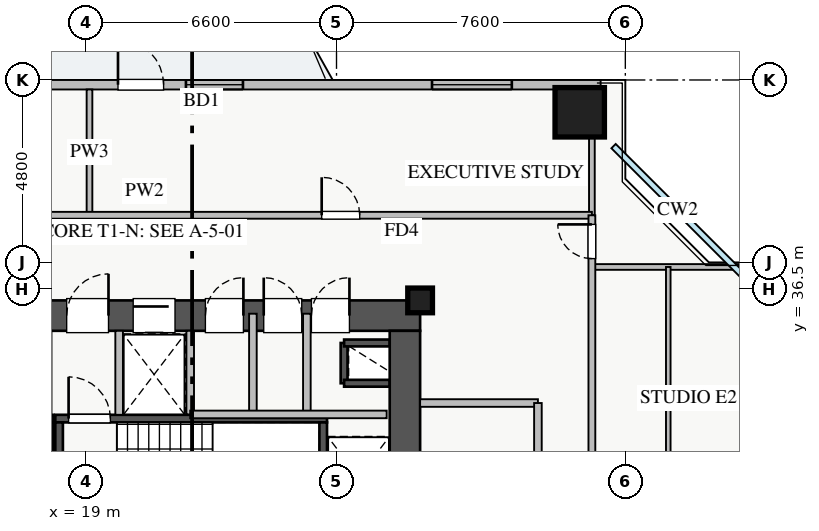
"""IFC4 building model, lengths in metres.
Left out: names, types, materials, properties, quantities, classifications, styles, units other than length and angle.
Written with IfcOpenShell. Run it as: python <this file> out.ifc"""

import sys

from ifc_helpers import new_model, si_unit, direction, frame, frame_2d, origin, origin_2d, place, context, subcontext, project, spatial, rectangle, extrude, source, transform, mapped, element, fill, save


model = new_model("IFC4")
c1 = context("Model", 3, precision=1e-05, world=origin(), true_north=direction((0.0, 1.0)))
c2 = subcontext(c1, "Body", "Model", "MODEL_VIEW")
j1 = project(units=[si_unit("LENGTHUNIT", "METRE"), si_unit("PLANEANGLEUNIT", "RADIAN")], contexts=[c1])
p1 = place(None, origin())
s1 = spatial("IfcSite", under=j1, at=p1, CompositionType="ELEMENT")
p2 = place(p1, origin())
s2 = spatial("IfcBuilding", under=s1, at=p2, CompositionType="ELEMENT")
p3 = place(p2, frame((0.0, 0.0, 23.0)))
s3 = spatial("IfcBuildingStorey", under=s2, at=p3, CompositionType="ELEMENT", Elevation=23.0)
p4 = place(p3, frame((25.8, 34.02, 0.0), z_axis=(0.0, 0.0, 1.0), x_axis=(0.0, 1.0, 0.0)))
e1 = element("IfcWall", 1, at=p4, inside=s3, PredefinedType="SHEAR", context=c2, shape_type="SweptSolid", body=[
    extrude(rectangle(XDim=1.06, YDim=0.18, at=frame_2d((0.53, 0.0))), origin(), (0.0, 0.0, 1.0), 3.07),
])
for number, where, z_axis, x_axis in (
    (2, (25.8, 35.08, 0.0), (0.0, 0.0, 1.0), (1.0, 0.0, 0.0)),
    (3, (25.8, 34.02, 0.0), (0.0, 0.0, 1.0), (1.0, 0.0, 0.0)),
):
    element("IfcWall", number, at=place(p3, frame(where, z_axis=z_axis, x_axis=x_axis)), inside=s3, PredefinedType="SHEAR", context=c2, shape_type="SweptSolid", body=[
        extrude(rectangle(XDim=1.2, YDim=0.18, at=frame_2d((0.6, 0.0))), origin(), (0.0, 0.0, 1.0), 3.07),
    ])
p5 = place(p3, frame((19.88, 33.2, 0.0), z_axis=(0.0, 0.0, 1.0), x_axis=(1.0, 0.0, 0.0)))
e4 = element("IfcWall", 4, at=p5, inside=s3, PredefinedType="SHEAR", context=c2, shape_type="SweptSolid", body=[
    extrude(rectangle(XDim=1.87, YDim=0.18, at=frame_2d((0.935, 0.0))), origin(), (0.0, 0.0, 1.0), 3.07),
])
p6 = place(p3, frame((11.0, 33.09, 0.0), z_axis=(0.0, 0.0, 1.0), x_axis=(1.0, 0.0, 0.0)))
e5 = element("IfcWall", 5, at=p6, inside=s3, PredefinedType="SHEAR", context=c2, shape_type="SweptSolid", body=[
    extrude(rectangle(XDim=7.15, YDim=0.2, at=frame_2d((3.575, 0.0))), origin(), (0.0, 0.0, 1.0), 3.25),
])
p7 = place(p6, frame((0.35, 0.0, 0.0)))
e6 = element("IfcOpeningElement", 6, at=p7, cuts=e5, PredefinedType="OPENING", context=c2, shape_type="SweptSolid", body=[
    extrude(rectangle(XDim=1.1, YDim=2.05, at=frame_2d((0.55, 1.025))), frame((0.0, 0.11, 0.0), z_axis=(0.0, -1.0, 0.0), x_axis=(1.0, 0.0, 0.0)), (0.0, 0.0, 1.0), 0.22),
])
p8 = place(p3, frame((18.05, 30.05, 0.0), z_axis=(0.0, 0.0, 1.0), x_axis=(0.0, 1.0, 0.0)))
e7 = element("IfcWall", 7, at=p8, inside=s3, PredefinedType="SHEAR", context=c2, shape_type="SweptSolid", body=[
    extrude(rectangle(XDim=2.94, YDim=0.2, at=frame_2d((1.47, 0.0))), origin(), (0.0, 0.0, 1.0), 3.25),
])
p9 = place(p3, frame((18.2, 33.09, 0.0), z_axis=(0.0, 0.0, 1.0), x_axis=(1.0, 0.0, 0.0)))
e8 = element("IfcWall", 8, at=p9, inside=s3, PredefinedType="SHEAR", context=c2, shape_type="SweptSolid", body=[
    extrude(rectangle(XDim=7.15, YDim=0.2, at=frame_2d((3.575, 0.0))), origin(), (0.0, 0.0, 1.0), 3.25),
])
p10 = place(p9, frame((0.35, 0.0, 0.0)))
e9 = element("IfcOpeningElement", 9, at=p10, cuts=e8, PredefinedType="OPENING", context=c2, shape_type="SweptSolid", body=[
    extrude(rectangle(XDim=1.1, YDim=2.05, at=frame_2d((0.55, 1.025))), frame((0.0, 0.11, 0.0), z_axis=(0.0, -1.0, 0.0), x_axis=(1.0, 0.0, 0.0)), (0.0, 0.0, 1.0), 0.22),
])
for number, where, z_axis, x_axis in (
    (10, (18.3, 30.05, 0.0), (0.0, 0.0, 1.0), (0.0, 1.0, 0.0)),
    (11, (25.25, 30.05, 0.0), (0.0, 0.0, 1.0), (0.0, 1.0, 0.0)),
):
    element("IfcWall", number, at=place(p3, frame(where, z_axis=z_axis, x_axis=x_axis)), inside=s3, PredefinedType="SHEAR", context=c2, shape_type="SweptSolid", body=[
        extrude(rectangle(XDim=2.94, YDim=0.2, at=frame_2d((1.47, 0.0))), origin(), (0.0, 0.0, 1.0), 3.25),
    ])
p11 = place(p3, frame((10.2, 35.8, 0.0), z_axis=(0.0, 0.0, 1.0), x_axis=(1.0, 0.0, 0.0)))
e12 = element("IfcWall", 12, at=p11, inside=s3, PredefinedType="SHEAR", context=c2, shape_type="SweptSolid", body=[
    extrude(rectangle(XDim=17.6, YDim=0.8, at=frame_2d((8.8, 0.0))), origin(), (0.0, 0.0, 1.0), 3.25),
])
p12 = place(p11, frame((1.15, 0.0, 0.0)))
e13 = element("IfcOpeningElement", 13, at=p12, cuts=e12, PredefinedType="OPENING", context=c2, shape_type="SweptSolid", body=[
    extrude(rectangle(XDim=1.1, YDim=2.05, at=frame_2d((0.55, 1.025))), frame((0.0, 0.41, 0.0), z_axis=(0.0, -1.0, 0.0), x_axis=(1.0, 0.0, 0.0)), (0.0, 0.0, 1.0), 0.82),
])
p13 = place(p11, frame((8.3, 0.0, 0.0)))
e14 = element("IfcOpeningElement", 14, at=p13, cuts=e12, PredefinedType="OPENING", context=c2, shape_type="SweptSolid", body=[
    extrude(rectangle(XDim=1.1, YDim=2.05, at=frame_2d((0.55, 1.025))), frame((0.0, 0.41, 0.0), z_axis=(0.0, -1.0, 0.0), x_axis=(1.0, 0.0, 0.0)), (0.0, 0.0, 1.0), 0.82),
])
p14 = place(p11, frame((10.05, 0.0, 0.0)))
e15 = element("IfcOpeningElement", 15, at=p14, cuts=e12, PredefinedType="OPENING", context=c2, shape_type="SweptSolid", body=[
    extrude(rectangle(XDim=1.1, YDim=2.05, at=frame_2d((0.55, 1.025))), frame((0.0, 0.41, 0.0), z_axis=(0.0, -1.0, 0.0), x_axis=(1.0, 0.0, 0.0)), (0.0, 0.0, 1.0), 0.82),
])
p15 = place(p11, frame((14.74, 0.0, 0.0)))
e16 = element("IfcOpeningElement", 16, at=p15, cuts=e12, PredefinedType="OPENING", context=c2, shape_type="SweptSolid", body=[
    extrude(rectangle(XDim=1.0, YDim=2.05, at=frame_2d((0.5, 1.025))), frame((0.0, 0.41, 0.0), z_axis=(0.0, -1.0, 0.0), x_axis=(1.0, 0.0, 0.0)), (0.0, 0.0, 1.0), 0.82),
])
p16 = place(p11, frame((11.95, 0.0, 0.0)))
e17 = element("IfcOpeningElement", 17, at=p16, cuts=e12, PredefinedType="OPENING", context=c2, shape_type="SweptSolid", body=[
    extrude(rectangle(XDim=1.0, YDim=2.05, at=frame_2d((0.5, 1.025))), frame((0.0, 0.41, 0.0), z_axis=(0.0, -1.0, 0.0), x_axis=(1.0, 0.0, 0.0)), (0.0, 0.0, 1.0), 0.82),
])
p17 = place(p11, frame((13.485, 0.0, 0.0)))
e18 = element("IfcOpeningElement", 18, at=p17, cuts=e12, PredefinedType="OPENING", context=c2, shape_type="SweptSolid", body=[
    extrude(rectangle(XDim=1.0, YDim=2.05, at=frame_2d((0.5, 1.025))), frame((0.0, 0.41, 0.0), z_axis=(0.0, -1.0, 0.0), x_axis=(1.0, 0.0, 0.0)), (0.0, 0.0, 1.0), 0.82),
])
p18 = place(p3, frame((27.4, 29.8, 0.0), z_axis=(0.0, 0.0, 1.0), x_axis=(0.0, 1.0, 0.0)))
e19 = element("IfcWall", 19, at=p18, inside=s3, PredefinedType="SHEAR", context=c2, shape_type="SweptSolid", body=[
    extrude(rectangle(XDim=5.6, YDim=0.8, at=frame_2d((2.8, 0.0))), origin(), (0.0, 0.0, 1.0), 3.25),
])
p19 = place(p18, frame((1.1, 0.0, 0.0)))
e20 = element("IfcOpeningElement", 20, at=p19, cuts=e19, PredefinedType="OPENING", context=c2, shape_type="SweptSolid", body=[
    extrude(rectangle(XDim=1.3, YDim=2.05, at=frame_2d((0.65, 1.025))), frame((0.0, 0.41, 0.0), z_axis=(0.0, -1.0, 0.0), x_axis=(1.0, 0.0, 0.0)), (0.0, 0.0, 1.0), 0.82),
])
m1 = source(origin(), c2, "Body", "SweptSolid", [
    extrude(rectangle(XDim=0.65, YDim=0.65, at=origin_2d()), origin(), (0.0, 0.0, 1.0), 3.25),
])
p20 = place(p3, frame((27.8, 36.2, 0.0), z_axis=(0.0, 0.0, 1.0), x_axis=(1.0, 0.0, 0.0)))
e21 = element("IfcColumn", 21, at=p20, inside=s3, PredefinedType="PILASTER", context=c2, shape_type="MappedRepresentation", body=[
    mapped(m1, transform((0.0, 0.0, 0.0), x_axis=(1.0, 0.0, 0.0), y_axis=(0.0, 1.0, 0.0), z_axis=(0.0, 0.0, 1.0), scale=1.0)),
])
m2 = source(origin(), c2, "Body", "SweptSolid", [
    extrude(rectangle(XDim=1.3, YDim=1.3, at=origin_2d()), origin(), (0.0, 0.0, 1.0), 3.25),
])
p21 = place(p3, frame((32.0, 41.15, 0.0), z_axis=(0.0, 0.0, 1.0), x_axis=(1.0, 0.0, 0.0)))
e22 = element("IfcColumn", 22, at=p21, inside=s3, PredefinedType="COLUMN", context=c2, shape_type="MappedRepresentation", body=[
    mapped(m2, transform((0.0, 0.0, 0.0), x_axis=(1.0, 0.0, 0.0), y_axis=(0.0, 1.0, 0.0), z_axis=(0.0, 0.0, 1.0), scale=1.0)),
])
p22 = place(p3, frame((5.45, 41.875, 0.0), z_axis=(0.0, 0.0, 1.0), x_axis=(1.0, 0.0, 0.0)))
e23 = element("IfcWall", 23, at=p22, inside=s3, PredefinedType="STANDARD", context=c2, shape_type="SweptSolid", body=[
    extrude(rectangle(XDim=27.1, YDim=0.25, at=frame_2d((13.55, 0.0))), origin(), (0.0, 0.0, 1.0), 2.61),
])
p23 = place(p22, frame((14.4, 0.0, 0.0)))
e24 = element("IfcOpeningElement", 24, at=p23, cuts=e23, PredefinedType="OPENING", context=c2, shape_type="SweptSolid", body=[
    extrude(rectangle(XDim=1.2, YDim=2.1, at=frame_2d((0.6, 1.05))), frame((0.0, 0.135, 0.0), z_axis=(0.0, -1.0, 0.0), x_axis=(1.0, 0.0, 0.0)), (0.0, 0.0, 1.0), 0.27),
])
p24 = place(p22, frame((1.48, 0.0, 0.9)))
e25 = element("IfcOpeningElement", 25, at=p24, cuts=e23, PredefinedType="OPENING", context=c2, shape_type="SweptSolid", body=[
    extrude(rectangle(XDim=1.5, YDim=1.5, at=frame_2d((0.75, 0.75))), frame((0.0, 0.135, 0.0), z_axis=(0.0, -1.0, 0.0), x_axis=(1.0, 0.0, 0.0)), (0.0, 0.0, 1.0), 0.27),
])
p25 = place(p22, frame((9.263, 0.0, 0.9)))
e26 = element("IfcOpeningElement", 26, at=p25, cuts=e23, PredefinedType="OPENING", context=c2, shape_type="SweptSolid", body=[
    extrude(rectangle(XDim=1.8, YDim=1.45, at=frame_2d((0.9, 0.725))), frame((0.0, 0.135, 0.0), z_axis=(0.0, -1.0, 0.0), x_axis=(1.0, 0.0, 0.0)), (0.0, 0.0, 1.0), 0.27),
])
p26 = place(p22, frame((16.188, 0.0, 0.9)))
e27 = element("IfcOpeningElement", 27, at=p26, cuts=e23, PredefinedType="OPENING", context=c2, shape_type="SweptSolid", body=[
    extrude(rectangle(XDim=1.5, YDim=1.45, at=frame_2d((0.75, 0.725))), frame((0.0, 0.135, 0.0), z_axis=(0.0, -1.0, 0.0), x_axis=(1.0, 0.0, 0.0)), (0.0, 0.0, 1.0), 0.27),
])
p27 = place(p22, frame((22.663, 0.0, 0.9)))
e28 = element("IfcOpeningElement", 28, at=p27, cuts=e23, PredefinedType="OPENING", context=c2, shape_type="SweptSolid", body=[
    extrude(rectangle(XDim=2.1, YDim=1.48, at=frame_2d((1.05, 0.74))), frame((0.0, 0.135, 0.0), z_axis=(0.0, -1.0, 0.0), x_axis=(1.0, 0.0, 0.0)), (0.0, 0.0, 1.0), 0.27),
])
p28 = place(p22, frame((5.114, 0.0, 0.9)))
e29 = element("IfcOpeningElement", 29, at=p28, cuts=e23, PredefinedType="OPENING", context=c2, shape_type="SweptSolid", body=[
    extrude(rectangle(XDim=2.4, YDim=1.5, at=frame_2d((1.2, 0.75))), frame((0.0, 0.135, 0.0), z_axis=(0.0, -1.0, 0.0), x_axis=(1.0, 0.0, 0.0)), (0.0, 0.0, 1.0), 0.27),
])
p29 = place(p3, frame((27.8, 33.5, 0.0), z_axis=(0.0, 0.0, 1.0), x_axis=(1.0, 0.0, 0.0)))
e30 = element("IfcWall", 30, at=p29, inside=s3, PredefinedType="PARTITIONING", context=c2, shape_type="SweptSolid", body=[
    extrude(rectangle(XDim=3.1, YDim=0.2, at=frame_2d((1.55, 0.0))), origin(), (0.0, 0.0, 1.0), 3.07),
])
p30 = place(p3, frame((30.9, 29.6, 0.0), z_axis=(0.0, 0.0, 1.0), x_axis=(0.0, 1.0, 0.0)))
e31 = element("IfcWall", 31, at=p30, inside=s3, PredefinedType="PARTITIONING", context=c2, shape_type="SweptSolid", body=[
    extrude(rectangle(XDim=3.9, YDim=0.2, at=frame_2d((1.95, 0.0))), origin(), (0.0, 0.0, 1.0), 3.07),
])
p31 = place(p30, frame((1.4, 0.0, 0.0)))
e32 = element("IfcOpeningElement", 32, at=p31, cuts=e31, PredefinedType="OPENING", context=c2, shape_type="SweptSolid", body=[
    extrude(rectangle(XDim=1.1, YDim=2.05, at=frame_2d((0.55, 1.025))), frame((0.0, 0.11, 0.0), z_axis=(0.0, -1.0, 0.0), x_axis=(1.0, 0.0, 0.0)), (0.0, 0.0, 1.0), 0.22),
])
p32 = place(p3, frame((19.88, 33.19, 0.0), z_axis=(0.0, 0.0, 1.0), x_axis=(0.0, 1.0, 0.0)))
e33 = element("IfcWall", 33, at=p32, inside=s3, PredefinedType="PARTITIONING", context=c2, shape_type="SweptSolid", body=[
    extrude(rectangle(XDim=2.21, YDim=0.2, at=frame_2d((1.105, 0.0))), origin(), (0.0, 0.0, 1.0), 3.07),
])
p33 = place(p3, frame((24.82, 33.2, 0.0), z_axis=(0.0, 0.0, 1.0), x_axis=(0.0, 1.0, 0.0)))
e34 = element("IfcWall", 34, at=p33, inside=s3, PredefinedType="PARTITIONING", context=c2, shape_type="SweptSolid", body=[
    extrude(rectangle(XDim=2.65, YDim=0.2, at=frame_2d((1.325, 0.0))), origin(), (0.0, 0.0, 1.0), 3.07),
])
p34 = place(p3, frame((21.75, 33.2, 0.0), z_axis=(0.0, 0.0, 1.0), x_axis=(0.0, 1.0, 0.0)))
e35 = element("IfcWall", 35, at=p34, inside=s3, PredefinedType="PARTITIONING", context=c2, shape_type="SweptSolid", body=[
    extrude(rectangle(XDim=2.2, YDim=0.2, at=frame_2d((1.1, 0.0))), origin(), (0.0, 0.0, 1.0), 3.07),
])
p35 = place(p3, frame((23.4, 33.2, 0.0), z_axis=(0.0, 0.0, 1.0), x_axis=(0.0, 1.0, 0.0)))
e36 = element("IfcWall", 36, at=p35, inside=s3, PredefinedType="PARTITIONING", context=c2, shape_type="SweptSolid", body=[
    extrude(rectangle(XDim=2.65, YDim=0.2, at=frame_2d((1.325, 0.0))), origin(), (0.0, 0.0, 1.0), 3.07),
])
p36 = place(p3, frame((21.75, 33.2, 0.0), z_axis=(0.0, 0.0, 1.0), x_axis=(1.0, 0.0, 0.0)))
e37 = element("IfcWall", 37, at=p36, inside=s3, PredefinedType="PARTITIONING", context=c2, shape_type="SweptSolid", body=[
    extrude(rectangle(XDim=5.17, YDim=0.2, at=frame_2d((2.585, 0.0))), origin(), (0.0, 0.0, 1.0), 3.07),
])
p37 = place(p3, frame((19.1, 38.44, 0.0), z_axis=(0.0, 0.0, 1.0), x_axis=(0.0, 1.0, 0.0)))
e38 = element("IfcWall", 38, at=p37, inside=s3, PredefinedType="PARTITIONING", context=c2, shape_type="SweptSolid", body=[
    extrude(rectangle(XDim=3.31, YDim=0.15, at=frame_2d((1.655, 0.0))), origin(), (0.0, 0.0, 1.0), 2.865),
])
p38 = place(p3, frame((32.32, 38.44, 0.0), z_axis=(0.0, 0.0, 1.0), x_axis=(0.0, 1.0, 0.0)))
e39 = element("IfcWall", 39, at=p38, inside=s3, PredefinedType="PARTITIONING", context=c2, shape_type="SweptSolid", body=[
    extrude(rectangle(XDim=3.31, YDim=0.15, at=frame_2d((1.655, 0.0))), origin(), (0.0, 0.0, 1.0), 3.07),
])
p39 = place(p3, frame((8.78, 38.44, 0.0), z_axis=(0.0, 0.0, 1.0), x_axis=(1.0, 0.0, 0.0)))
e40 = element("IfcWall", 40, at=p39, inside=s3, PredefinedType="PARTITIONING", context=c2, shape_type="SweptSolid", body=[
    extrude(rectangle(XDim=23.54, YDim=0.18, at=frame_2d((11.77, 0.0))), origin(), (0.0, 0.0, 1.0), 3.07),
])
p40 = place(p39, frame((4.66, 0.0, 0.0)))
e41 = element("IfcOpeningElement", 41, at=p40, cuts=e40, PredefinedType="OPENING", context=c2, shape_type="SweptSolid", body=[
    extrude(rectangle(XDim=1.0, YDim=2.05, at=frame_2d((0.5, 1.025))), frame((0.0, 0.1, 0.0), z_axis=(0.0, -1.0, 0.0), x_axis=(1.0, 0.0, 0.0)), (0.0, 0.0, 1.0), 0.2),
])
p41 = place(p39, frame((16.43, 0.0, 0.0)))
e42 = element("IfcOpeningElement", 42, at=p41, cuts=e40, PredefinedType="OPENING", context=c2, shape_type="SweptSolid", body=[
    extrude(rectangle(XDim=1.0, YDim=2.05, at=frame_2d((0.5, 1.025))), frame((0.0, 0.1, 0.0), z_axis=(0.0, -1.0, 0.0), x_axis=(1.0, 0.0, 0.0)), (0.0, 0.0, 1.0), 0.2),
])
p42 = place(p3, frame((32.32, 37.08, 0.0), z_axis=(0.0, 0.0, 1.0), x_axis=(1.0, 0.0, 0.0)))
e43 = element("IfcWall", 43, at=p42, inside=s3, PredefinedType="PARTITIONING", context=c2, shape_type="SweptSolid", body=[
    extrude(rectangle(XDim=5.43, YDim=0.15, at=frame_2d((2.715, 0.0))), origin(), (0.0, 0.0, 1.0), 3.07),
])
p43 = place(p3, frame((34.33, 30.9, 0.0), z_axis=(0.0, 0.0, 1.0), x_axis=(0.0, 1.0, 0.0)))
e44 = element("IfcWall", 44, at=p43, inside=s3, PredefinedType="PLUMBINGWALL", context=c2, shape_type="SweptSolid", body=[
    extrude(rectangle(XDim=6.18, YDim=0.12, at=frame_2d((3.09, 0.0))), origin(), (0.0, 0.0, 1.0), 3.07),
])
p44 = place(p3, frame((32.32, 7.21, 0.0), z_axis=(0.0, 0.0, 1.0), x_axis=(0.0, 1.0, 0.0)))
e45 = element("IfcWall", 45, at=p44, inside=s3, PredefinedType="PARTITIONING", context=c2, shape_type="SweptSolid", body=[
    extrude(rectangle(XDim=31.23, YDim=0.18, at=frame_2d((15.615, 0.0))), origin(), (0.0, 0.0, 1.0), 2.865),
])
p45 = place(p44, frame((30.09, 0.0, 0.0)))
e46 = element("IfcOpeningElement", 46, at=p45, cuts=e45, PredefinedType="OPENING", context=c2, shape_type="SweptSolid", body=[
    extrude(rectangle(XDim=0.9, YDim=2.05, at=frame_2d((0.45, 1.025))), frame((0.0, 0.1, 0.0), z_axis=(0.0, -1.0, 0.0), x_axis=(1.0, 0.0, 0.0)), (0.0, 0.0, 1.0), 0.2),
])
p46 = place(p44, frame((0.415, 0.0, 0.0)))
e47 = element("IfcOpeningElement", 47, at=p46, cuts=e45, PredefinedType="OPENING", context=c2, shape_type="SweptSolid", body=[
    extrude(rectangle(XDim=0.9, YDim=2.05, at=frame_2d((0.45, 1.025))), frame((0.0, 0.1, 0.0), z_axis=(0.0, -1.0, 0.0), x_axis=(1.0, 0.0, 0.0)), (0.0, 0.0, 1.0), 0.2),
])
p47 = place(p44, frame((8.575, 0.0, 0.0)))
e48 = element("IfcOpeningElement", 48, at=p47, cuts=e45, PredefinedType="OPENING", context=c2, shape_type="SweptSolid", body=[
    extrude(rectangle(XDim=1.0, YDim=2.05, at=frame_2d((0.5, 1.025))), frame((0.0, 0.1, 0.0), z_axis=(0.0, -1.0, 0.0), x_axis=(1.0, 0.0, 0.0)), (0.0, 0.0, 1.0), 0.2),
])
p48 = place(p44, frame((19.375, 0.0, 0.0)))
e49 = element("IfcOpeningElement", 49, at=p48, cuts=e45, PredefinedType="OPENING", context=c2, shape_type="SweptSolid", body=[
    extrude(rectangle(XDim=1.0, YDim=2.05, at=frame_2d((0.5, 1.025))), frame((0.0, 0.1, 0.0), z_axis=(0.0, -1.0, 0.0), x_axis=(1.0, 0.0, 0.0)), (0.0, 0.0, 1.0), 0.2),
])
m3 = source(origin(), c2, "Body", "SweptSolid", [
    extrude(rectangle(XDim=1.2, YDim=2.1, at=frame_2d((0.6, 1.05))), frame((0.0, 0.025, 0.0), z_axis=(0.0, -1.0, 0.0), x_axis=(1.0, 0.0, 0.0)), (0.0, 0.0, 1.0), 0.05),
])
p49 = place(p23, origin())
e50 = element("IfcDoor", 50, at=p49, inside=s3, OperationType="SINGLE_SWING_LEFT", PredefinedType="DOOR", context=c2, shape_type="MappedRepresentation", body=[
    mapped(m3, transform((0.0, 0.0, 0.0), x_axis=(1.0, 0.0, 0.0), y_axis=(0.0, 1.0, 0.0), z_axis=(0.0, 0.0, 1.0), scale=1.0)),
])
fill(e24, e50)
m4 = source(origin(), c2, "Body", "SweptSolid", [
    extrude(rectangle(XDim=1.5, YDim=1.45, at=frame_2d((0.75, 0.725))), frame((0.0, 0.03, 0.0), z_axis=(0.0, -1.0, 0.0), x_axis=(1.0, 0.0, 0.0)), (0.0, 0.0, 1.0), 0.06),
])
p50 = place(p26, origin())
e51 = element("IfcWindow", 51, at=p50, inside=s3, PartitioningType="DOUBLE_PANEL_VERTICAL", PredefinedType="WINDOW", context=c2, shape_type="MappedRepresentation", body=[
    mapped(m4, transform((0.0, 0.0, 0.0), x_axis=(1.0, 0.0, 0.0), y_axis=(0.0, 1.0, 0.0), z_axis=(0.0, 0.0, 1.0), scale=1.0)),
])
fill(e27, e51)
m5 = source(origin(), c2, "Body", "SweptSolid", [
    extrude(rectangle(XDim=2.1, YDim=1.48, at=frame_2d((1.05, 0.74))), frame((0.0, 0.03, 0.0), z_axis=(0.0, -1.0, 0.0), x_axis=(1.0, 0.0, 0.0)), (0.0, 0.0, 1.0), 0.06),
])
p51 = place(p27, origin())
e52 = element("IfcWindow", 52, at=p51, inside=s3, PartitioningType="TRIPLE_PANEL_VERTICAL", PredefinedType="WINDOW", context=c2, shape_type="MappedRepresentation", body=[
    mapped(m5, transform((0.0, 0.0, 0.0), x_axis=(1.0, 0.0, 0.0), y_axis=(0.0, 1.0, 0.0), z_axis=(0.0, 0.0, 1.0), scale=1.0)),
])
fill(e28, e52)
m6 = source(origin(), c2, "Body", "SweptSolid", [
    extrude(rectangle(XDim=1.1, YDim=2.05, at=frame_2d((0.55, 1.025))), frame((0.0, 0.025, 0.0), z_axis=(0.0, -1.0, 0.0), x_axis=(1.0, 0.0, 0.0)), (0.0, 0.0, 1.0), 0.05),
])
p52 = place(p13, origin())
e53 = element("IfcDoor", 53, at=p52, inside=s3, OperationType="SINGLE_SWING_RIGHT", PredefinedType="DOOR", context=c2, shape_type="MappedRepresentation", body=[
    mapped(m6, transform((0.0, 0.0, 0.0), x_axis=(1.0, 0.0, 0.0), y_axis=(0.0, 1.0, 0.0), z_axis=(0.0, 0.0, 1.0), scale=1.0)),
])
fill(e14, e53)
p53 = place(p10, origin())
e54 = element("IfcDoor", 54, at=p53, inside=s3, OperationType="SINGLE_SWING_LEFT", PredefinedType="DOOR", context=c2, shape_type="MappedRepresentation", body=[
    mapped(m6, transform((0.0, 0.0, 0.0), x_axis=(1.0, 0.0, 0.0), y_axis=(0.0, 1.0, 0.0), z_axis=(0.0, 0.0, 1.0), scale=1.0)),
])
fill(e9, e54)
p54 = place(p14, origin())
e55 = element("IfcDoor", 55, at=p54, inside=s3, OperationType="SLIDING_TO_LEFT", PredefinedType="DOOR", context=c2, shape_type="MappedRepresentation", body=[
    mapped(m6, transform((0.0, 0.0, 0.0), x_axis=(1.0, 0.0, 0.0), y_axis=(0.0, 1.0, 0.0), z_axis=(0.0, 0.0, 1.0), scale=1.0)),
])
fill(e15, e55)
m7 = source(origin(), c2, "Body", "SweptSolid", [
    extrude(rectangle(XDim=1.0, YDim=2.05, at=frame_2d((0.5, 1.025))), frame((0.0, 0.025, 0.0), z_axis=(0.0, -1.0, 0.0), x_axis=(1.0, 0.0, 0.0)), (0.0, 0.0, 1.0), 0.05),
])
p55 = place(p15, origin())
e56 = element("IfcDoor", 56, at=p55, inside=s3, OperationType="SINGLE_SWING_RIGHT", PredefinedType="DOOR", context=c2, shape_type="MappedRepresentation", body=[
    mapped(m7, transform((0.0, 0.0, 0.0), x_axis=(1.0, 0.0, 0.0), y_axis=(0.0, 1.0, 0.0), z_axis=(0.0, 0.0, 1.0), scale=1.0)),
])
fill(e16, e56)
p56 = place(p16, origin())
e57 = element("IfcDoor", 57, at=p56, inside=s3, OperationType="SINGLE_SWING_RIGHT", PredefinedType="DOOR", context=c2, shape_type="MappedRepresentation", body=[
    mapped(m7, transform((0.0, 0.0, 0.0), x_axis=(1.0, 0.0, 0.0), y_axis=(0.0, 1.0, 0.0), z_axis=(0.0, 0.0, 1.0), scale=1.0)),
])
fill(e17, e57)
p57 = place(p17, origin())
e58 = element("IfcDoor", 58, at=p57, inside=s3, OperationType="SINGLE_SWING_LEFT", PredefinedType="DOOR", context=c2, shape_type="MappedRepresentation", body=[
    mapped(m7, transform((0.0, 0.0, 0.0), x_axis=(1.0, 0.0, 0.0), y_axis=(0.0, 1.0, 0.0), z_axis=(0.0, 0.0, 1.0), scale=1.0)),
])
fill(e18, e58)
p58 = place(p41, origin())
e59 = element("IfcDoor", 59, at=p58, inside=s3, OperationType="SINGLE_SWING_LEFT", PredefinedType="DOOR", context=c2, shape_type="MappedRepresentation", body=[
    mapped(m7, transform((0.0, 0.0, 0.0), x_axis=(1.0, 0.0, 0.0), y_axis=(0.0, 1.0, 0.0), z_axis=(0.0, 0.0, 1.0), scale=1.0)),
])
fill(e42, e59)
m8 = source(origin(), c2, "Body", "SweptSolid", [
    extrude(rectangle(XDim=0.9, YDim=2.05, at=frame_2d((0.45, 1.025))), frame((0.0, 0.025, 0.0), z_axis=(0.0, -1.0, 0.0), x_axis=(1.0, 0.0, 0.0)), (0.0, 0.0, 1.0), 0.05),
])
p59 = place(p45, origin())
e60 = element("IfcDoor", 60, at=p59, inside=s3, OperationType="SINGLE_SWING_RIGHT", PredefinedType="DOOR", context=c2, shape_type="MappedRepresentation", body=[
    mapped(m8, transform((0.0, 0.0, 0.0), x_axis=(1.0, 0.0, 0.0), y_axis=(0.0, 1.0, 0.0), z_axis=(0.0, 0.0, 1.0), scale=1.0)),
])
fill(e46, e60)
save(model, sys.argv[1])
